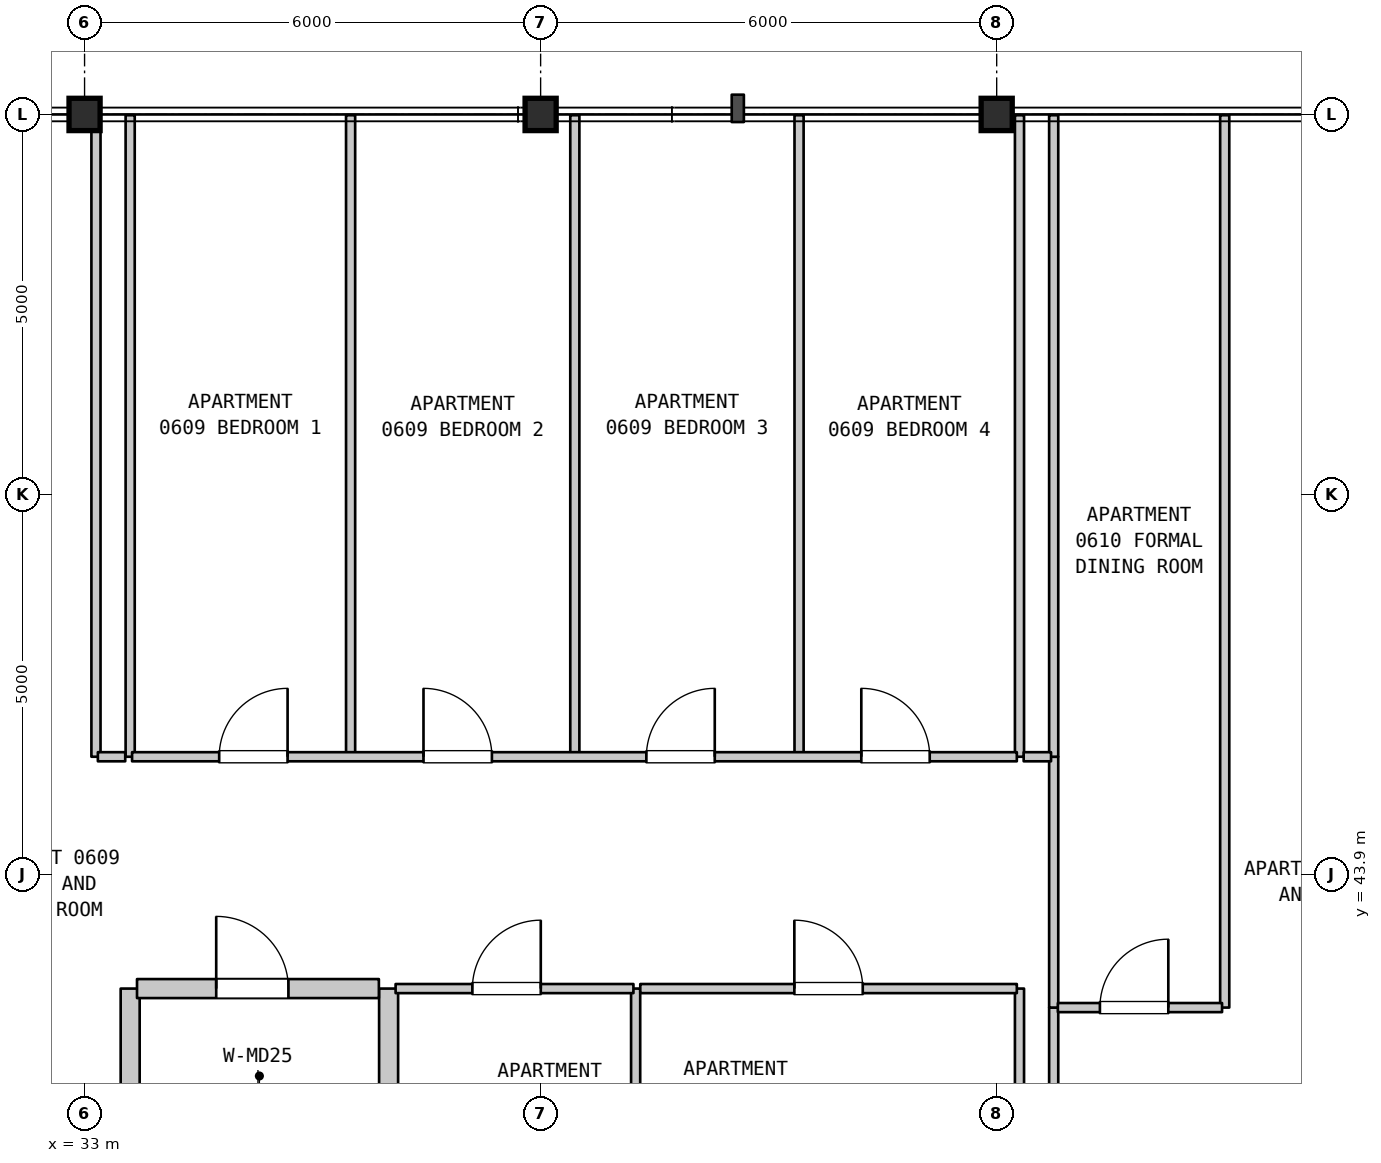
"""IFC4 building model, lengths in metres.
Left out: names, types, materials, properties, quantities, classifications, styles, units other than length and angle.
Written with IfcOpenShell. Run it as: python <this file> out.ifc"""

import sys

from ifc_helpers import new_model, si_unit, direction, frame, frame_2d, origin, origin_2d, place, context, subcontext, project, spatial, rectangle, i_section, extrude, element, fill, save


model = new_model("IFC4")
c1 = context("Model", 3, precision=1e-05, world=origin(), true_north=direction((0.0, 1.0)))
c2 = subcontext(c1, "Body", "Model", "MODEL_VIEW")
j1 = project(units=[si_unit("LENGTHUNIT", "METRE"), si_unit("PLANEANGLEUNIT", "RADIAN")], contexts=[c1])
p1 = place(None, origin())
s1 = spatial("IfcSite", under=j1, at=p1, CompositionType="ELEMENT")
p2 = place(p1, origin())
s2 = spatial("IfcBuilding", under=s1, at=p2, CompositionType="ELEMENT")
p3 = place(p2, frame((0.0, 0.0, 31.4)))
s3 = spatial("IfcBuildingStorey", under=s2, at=p3, CompositionType="ELEMENT", Elevation=31.4)
for number, where, z_axis, x_axis in (
    (1, (33.0, 53.9, 0.0), (0.0, 0.0, 1.0), (1.0, 0.0, 0.0)),
    (2, (39.0, 53.9, 0.0), (0.0, 0.0, 1.0), (1.0, 0.0, 0.0)),
    (3, (45.0, 53.9, 0.0), (0.0, 0.0, 1.0), (1.0, 0.0, 0.0)),
):
    element("IfcColumn", number, at=place(p3, frame(where, z_axis=z_axis, x_axis=x_axis)), inside=s3, PredefinedType="COLUMN", context=c2, shape_type="SweptSolid", body=[
        extrude(i_section(OverallWidth=0.409, OverallDepth=0.425, WebThickness=0.032, FlangeThickness=0.052, FilletRadius=0.015, at=origin_2d()), origin(), (0.0, 0.0, 1.0), 3.7),
    ])
p4 = place(p3, frame((33.15, 45.45, 0.0), z_axis=(0.0, 0.0, 1.0), x_axis=(0.0, 1.0, 0.0)))
e4 = element("IfcWall", 4, at=p4, inside=s3, PredefinedType="PARTITIONING", context=c2, shape_type="SweptSolid", body=[
    extrude(rectangle(XDim=8.44, YDim=0.12, at=frame_2d((4.22, 0.0))), origin(), (0.0, 0.0, 1.0), 2.785),
])
p5 = place(p3, frame((33.6, 40.1, 0.0), z_axis=(0.0, 0.0, 1.0), x_axis=(0.0, 1.0, 0.0)))
e5 = element("IfcWall", 5, at=p5, inside=s3, PredefinedType="STANDARD", context=c2, shape_type="SweptSolid", body=[
    extrude(rectangle(XDim=2.3, YDim=0.25, at=frame_2d((1.15, 0.0))), origin(), (0.0, 0.0, 1.0), 3.385),
])
for number, where, z_axis, x_axis in (
    (6, (33.6, 45.45, 0.0), (0.0, 0.0, 1.0), (0.0, 1.0, 0.0)),
    (7, (36.5, 45.45, 0.0), (0.0, 0.0, 1.0), (0.0, 1.0, 0.0)),
):
    element("IfcWall", number, at=place(p3, frame(where, z_axis=z_axis, x_axis=x_axis)), inside=s3, PredefinedType="PARTITIONING", context=c2, shape_type="SweptSolid", body=[
        extrude(rectangle(XDim=8.44, YDim=0.12, at=frame_2d((4.22, 0.0))), origin(), (0.0, 0.0, 1.0), 3.385),
    ])
p6 = place(p3, frame((37.0, 40.1, 0.0), z_axis=(0.0, 0.0, 1.0), x_axis=(0.0, 1.0, 0.0)))
e8 = element("IfcWall", 8, at=p6, inside=s3, PredefinedType="STANDARD", context=c2, shape_type="SweptSolid", body=[
    extrude(rectangle(XDim=2.3, YDim=0.25, at=frame_2d((1.15, 0.0))), origin(), (0.0, 0.0, 1.0), 3.385),
])
p7 = place(p3, frame((39.45, 45.45, 0.0), z_axis=(0.0, 0.0, 1.0), x_axis=(0.0, 1.0, 0.0)))
e9 = element("IfcWall", 9, at=p7, inside=s3, PredefinedType="PARTITIONING", context=c2, shape_type="SweptSolid", body=[
    extrude(rectangle(XDim=8.44, YDim=0.12, at=frame_2d((4.22, 0.0))), origin(), (0.0, 0.0, 1.0), 3.385),
])
p8 = place(p3, frame((40.25, 40.1, 0.0), z_axis=(0.0, 0.0, 1.0), x_axis=(0.0, 1.0, 0.0)))
e10 = element("IfcWall", 10, at=p8, inside=s3, PredefinedType="PARTITIONING", context=c2, shape_type="SweptSolid", body=[
    extrude(rectangle(XDim=2.3, YDim=0.12, at=frame_2d((1.15, 0.0))), origin(), (0.0, 0.0, 1.0), 3.385),
])
p9 = place(p3, frame((42.4, 45.45, 0.0), z_axis=(0.0, 0.0, 1.0), x_axis=(0.0, 1.0, 0.0)))
e11 = element("IfcWall", 11, at=p9, inside=s3, PredefinedType="PARTITIONING", context=c2, shape_type="SweptSolid", body=[
    extrude(rectangle(XDim=8.44, YDim=0.12, at=frame_2d((4.22, 0.0))), origin(), (0.0, 0.0, 1.0), 3.385),
])
p10 = place(p3, frame((45.3, 40.1, 0.0), z_axis=(0.0, 0.0, 1.0), x_axis=(0.0, 1.0, 0.0)))
e12 = element("IfcWall", 12, at=p10, inside=s3, PredefinedType="PARTITIONING", context=c2, shape_type="SweptSolid", body=[
    extrude(rectangle(XDim=2.3, YDim=0.12, at=frame_2d((1.15, 0.0))), origin(), (0.0, 0.0, 1.0), 3.385),
])
p11 = place(p3, frame((45.3, 45.45, 0.0), z_axis=(0.0, 0.0, 1.0), x_axis=(0.0, 1.0, 0.0)))
e13 = element("IfcWall", 13, at=p11, inside=s3, PredefinedType="PARTITIONING", context=c2, shape_type="SweptSolid", body=[
    extrude(rectangle(XDim=8.44, YDim=0.12, at=frame_2d((4.22, 0.0))), origin(), (0.0, 0.0, 1.0), 3.385),
])
p12 = place(p3, frame((45.75, 40.1, 0.0), z_axis=(0.0, 0.0, 1.0), x_axis=(0.0, 1.0, 0.0)))
e14 = element("IfcWall", 14, at=p12, inside=s3, PredefinedType="PARTITIONING", context=c2, shape_type="SweptSolid", body=[
    extrude(rectangle(XDim=2.05, YDim=0.12, at=frame_2d((1.025, 0.0))), origin(), (0.0, 0.0, 1.0), 3.385),
])
p13 = place(p3, frame((45.75, 42.15, 0.0), z_axis=(0.0, 0.0, 1.0), x_axis=(0.0, 1.0, 0.0)))
e15 = element("IfcWall", 15, at=p13, inside=s3, PredefinedType="PARTITIONING", context=c2, shape_type="SweptSolid", body=[
    extrude(rectangle(XDim=3.3, YDim=0.12, at=frame_2d((1.65, 0.0))), origin(), (0.0, 0.0, 1.0), 3.385),
])
p14 = place(p3, frame((45.75, 45.45, 0.0), z_axis=(0.0, 0.0, 1.0), x_axis=(0.0, 1.0, 0.0)))
e16 = element("IfcWall", 16, at=p14, inside=s3, PredefinedType="PARTITIONING", context=c2, shape_type="SweptSolid", body=[
    extrude(rectangle(XDim=8.44, YDim=0.12, at=frame_2d((4.22, 0.0))), origin(), (0.0, 0.0, 1.0), 3.385),
])
p15 = place(p3, frame((48.0, 42.15, 0.0), z_axis=(0.0, 0.0, 1.0), x_axis=(0.0, 1.0, 0.0)))
e17 = element("IfcWall", 17, at=p15, inside=s3, PredefinedType="PARTITIONING", context=c2, shape_type="SweptSolid", body=[
    extrude(rectangle(XDim=11.74, YDim=0.12, at=frame_2d((5.87, 0.0))), origin(), (0.0, 0.0, 1.0), 3.385),
])
p16 = place(p3, frame((45.805, 42.15, 0.0), z_axis=(0.0, 0.0, 1.0), x_axis=(1.0, 0.0, 0.0)))
e18 = element("IfcWall", 18, at=p16, inside=s3, PredefinedType="PARTITIONING", context=c2, shape_type="SweptSolid", body=[
    extrude(rectangle(XDim=2.16, YDim=0.12, at=frame_2d((1.08, 0.0))), origin(), (0.0, 0.0, 1.0), 3.385),
])
p17 = place(p16, frame((0.553, 0.0, 0.0)))
e19 = element("IfcOpeningElement", 19, at=p17, cuts=e18, PredefinedType="OPENING", context=c2, shape_type="SweptSolid", body=[
    extrude(rectangle(XDim=0.9, YDim=2.15, at=frame_2d((0.45, 1.075))), frame((0.0, 0.07, 0.0), z_axis=(0.0, -1.0, 0.0), x_axis=(1.0, 0.0, 0.0)), (0.0, 0.0, 1.0), 0.14),
])
p18 = place(p3, frame((33.69, 42.4, 0.0), z_axis=(0.0, 0.0, 1.0), x_axis=(1.0, 0.0, 0.0)))
e20 = element("IfcWall", 20, at=p18, inside=s3, PredefinedType="STANDARD", context=c2, shape_type="SweptSolid", body=[
    extrude(rectangle(XDim=3.182, YDim=0.25, at=frame_2d((1.591, 0.0))), origin(), (0.0, 0.0, 1.0), 3.385),
])
p19 = place(p18, frame((1.042, 0.0, 0.0)))
e21 = element("IfcOpeningElement", 21, at=p19, cuts=e20, PredefinedType="OPENING", context=c2, shape_type="SweptSolid", body=[
    extrude(rectangle(XDim=0.95, YDim=2.15, at=frame_2d((0.475, 1.075))), frame((0.0, 0.135, 0.0), z_axis=(0.0, -1.0, 0.0), x_axis=(1.0, 0.0, 0.0)), (0.0, 0.0, 1.0), 0.27),
])
p20 = place(p3, frame((37.092, 42.4, 0.0), z_axis=(0.0, 0.0, 1.0), x_axis=(1.0, 0.0, 0.0)))
e22 = element("IfcWall", 22, at=p20, inside=s3, PredefinedType="PARTITIONING", context=c2, shape_type="SweptSolid", body=[
    extrude(rectangle(XDim=3.129, YDim=0.12, at=frame_2d((1.564, 0.0))), origin(), (0.0, 0.0, 1.0), 3.385),
])
p21 = place(p20, frame((1.01, 0.0, 0.0)))
e23 = element("IfcOpeningElement", 23, at=p21, cuts=e22, PredefinedType="OPENING", context=c2, shape_type="SweptSolid", body=[
    extrude(rectangle(XDim=0.9, YDim=2.1, at=frame_2d((0.45, 1.05))), frame((0.0, 0.07, 0.0), z_axis=(0.0, -1.0, 0.0), x_axis=(1.0, 0.0, 0.0)), (0.0, 0.0, 1.0), 0.14),
])
p22 = place(p3, frame((40.311, 42.4, 0.0), z_axis=(0.0, 0.0, 1.0), x_axis=(1.0, 0.0, 0.0)))
e24 = element("IfcWall", 24, at=p22, inside=s3, PredefinedType="PARTITIONING", context=c2, shape_type="SweptSolid", body=[
    extrude(rectangle(XDim=4.954, YDim=0.12, at=frame_2d((2.477, 0.0))), origin(), (0.0, 0.0, 1.0), 3.385),
])
p23 = place(p22, frame((2.027, 0.0, 0.0)))
e25 = element("IfcOpeningElement", 25, at=p23, cuts=e24, PredefinedType="OPENING", context=c2, shape_type="SweptSolid", body=[
    extrude(rectangle(XDim=0.9, YDim=2.15, at=frame_2d((0.45, 1.075))), frame((0.0, 0.07, 0.0), z_axis=(0.0, -1.0, 0.0), x_axis=(1.0, 0.0, 0.0)), (0.0, 0.0, 1.0), 0.14),
])
p24 = place(p3, frame((33.175, 45.45, 0.0), z_axis=(0.0, 0.0, 1.0), x_axis=(1.0, 0.0, 0.0)))
e26 = element("IfcWall", 26, at=p24, inside=s3, PredefinedType="PARTITIONING", context=c2, shape_type="SweptSolid", body=[
    extrude(rectangle(XDim=0.36, YDim=0.12, at=frame_2d((0.18, 0.0))), origin(), (0.0, 0.0, 1.0), 3.385),
])
p25 = place(p3, frame((33.625, 45.45, 0.0), z_axis=(0.0, 0.0, 1.0), x_axis=(1.0, 0.0, 0.0)))
e27 = element("IfcWall", 27, at=p25, inside=s3, PredefinedType="PARTITIONING", context=c2, shape_type="SweptSolid", body=[
    extrude(rectangle(XDim=11.64, YDim=0.12, at=frame_2d((5.82, 0.0))), origin(), (0.0, 0.0, 1.0), 3.385),
])
p26 = place(p25, frame((1.146, 0.0, 0.0)))
e28 = element("IfcOpeningElement", 28, at=p26, cuts=e27, PredefinedType="OPENING", context=c2, shape_type="SweptSolid", body=[
    extrude(rectangle(XDim=0.9, YDim=2.15, at=frame_2d((0.45, 1.075))), frame((0.0, 0.07, 0.0), z_axis=(0.0, -1.0, 0.0), x_axis=(1.0, 0.0, 0.0)), (0.0, 0.0, 1.0), 0.14),
])
p27 = place(p25, frame((3.834, 0.0, 0.0)))
e29 = element("IfcOpeningElement", 29, at=p27, cuts=e27, PredefinedType="OPENING", context=c2, shape_type="SweptSolid", body=[
    extrude(rectangle(XDim=0.9, YDim=2.15, at=frame_2d((0.45, 1.075))), frame((0.0, 0.07, 0.0), z_axis=(0.0, -1.0, 0.0), x_axis=(1.0, 0.0, 0.0)), (0.0, 0.0, 1.0), 0.14),
])
p28 = place(p25, frame((6.766, 0.0, 0.0)))
e30 = element("IfcOpeningElement", 30, at=p28, cuts=e27, PredefinedType="OPENING", context=c2, shape_type="SweptSolid", body=[
    extrude(rectangle(XDim=0.9, YDim=2.15, at=frame_2d((0.45, 1.075))), frame((0.0, 0.07, 0.0), z_axis=(0.0, -1.0, 0.0), x_axis=(1.0, 0.0, 0.0)), (0.0, 0.0, 1.0), 0.14),
])
p29 = place(p25, frame((9.594, 0.0, 0.0)))
e31 = element("IfcOpeningElement", 31, at=p29, cuts=e27, PredefinedType="OPENING", context=c2, shape_type="SweptSolid", body=[
    extrude(rectangle(XDim=0.9, YDim=2.15, at=frame_2d((0.45, 1.075))), frame((0.0, 0.07, 0.0), z_axis=(0.0, -1.0, 0.0), x_axis=(1.0, 0.0, 0.0)), (0.0, 0.0, 1.0), 0.14),
])
p30 = place(p3, frame((45.355, 45.45, 0.0), z_axis=(0.0, 0.0, 1.0), x_axis=(1.0, 0.0, 0.0)))
e32 = element("IfcWall", 32, at=p30, inside=s3, PredefinedType="PARTITIONING", context=c2, shape_type="SweptSolid", body=[
    extrude(rectangle(XDim=0.36, YDim=0.12, at=frame_2d((0.18, 0.0))), origin(), (0.0, 0.0, 1.0), 3.385),
])
p31 = place(p17, origin())
e33 = element("IfcDoor", 33, at=p31, inside=s3, OperationType="SINGLE_SWING_RIGHT", PredefinedType="DOOR", context=c2, shape_type="SweptSolid", body=[
    extrude(rectangle(XDim=0.9, YDim=2.15, at=frame_2d((0.45, 1.075))), frame((0.0, 0.025, 0.0), z_axis=(0.0, -1.0, 0.0), x_axis=(1.0, 0.0, 0.0)), (0.0, 0.0, 1.0), 0.05),
])
fill(e19, e33)
p32 = place(p19, origin())
e34 = element("IfcDoor", 34, at=p32, inside=s3, OperationType="SINGLE_SWING_LEFT", PredefinedType="DOOR", context=c2, shape_type="SweptSolid", body=[
    extrude(rectangle(XDim=0.95, YDim=2.15, at=frame_2d((0.475, 1.075))), frame((0.0, 0.025, 0.0), z_axis=(0.0, -1.0, 0.0), x_axis=(1.0, 0.0, 0.0)), (0.0, 0.0, 1.0), 0.05),
])
fill(e21, e34)
p33 = place(p21, origin())
e35 = element("IfcDoor", 35, at=p33, inside=s3, OperationType="SINGLE_SWING_RIGHT", PredefinedType="DOOR", context=c2, shape_type="SweptSolid", body=[
    extrude(rectangle(XDim=0.9, YDim=2.1, at=frame_2d((0.45, 1.05))), frame((0.0, 0.025, 0.0), z_axis=(0.0, -1.0, 0.0), x_axis=(1.0, 0.0, 0.0)), (0.0, 0.0, 1.0), 0.05),
])
fill(e23, e35)
p34 = place(p23, origin())
e36 = element("IfcDoor", 36, at=p34, inside=s3, OperationType="SINGLE_SWING_LEFT", PredefinedType="DOOR", context=c2, shape_type="SweptSolid", body=[
    extrude(rectangle(XDim=0.9, YDim=2.15, at=frame_2d((0.45, 1.075))), frame((0.0, 0.025, 0.0), z_axis=(0.0, -1.0, 0.0), x_axis=(1.0, 0.0, 0.0)), (0.0, 0.0, 1.0), 0.05),
])
fill(e25, e36)
p35 = place(p26, origin())
e37 = element("IfcDoor", 37, at=p35, inside=s3, OperationType="SINGLE_SWING_RIGHT", PredefinedType="DOOR", context=c2, shape_type="SweptSolid", body=[
    extrude(rectangle(XDim=0.9, YDim=2.15, at=frame_2d((0.45, 1.075))), frame((0.0, 0.025, 0.0), z_axis=(0.0, -1.0, 0.0), x_axis=(1.0, 0.0, 0.0)), (0.0, 0.0, 1.0), 0.05),
])
fill(e28, e37)
p36 = place(p27, origin())
e38 = element("IfcDoor", 38, at=p36, inside=s3, OperationType="SINGLE_SWING_LEFT", PredefinedType="DOOR", context=c2, shape_type="SweptSolid", body=[
    extrude(rectangle(XDim=0.9, YDim=2.15, at=frame_2d((0.45, 1.075))), frame((0.0, 0.025, 0.0), z_axis=(0.0, -1.0, 0.0), x_axis=(1.0, 0.0, 0.0)), (0.0, 0.0, 1.0), 0.05),
])
fill(e29, e38)
p37 = place(p28, origin())
e39 = element("IfcDoor", 39, at=p37, inside=s3, OperationType="SINGLE_SWING_RIGHT", PredefinedType="DOOR", context=c2, shape_type="SweptSolid", body=[
    extrude(rectangle(XDim=0.9, YDim=2.15, at=frame_2d((0.45, 1.075))), frame((0.0, 0.025, 0.0), z_axis=(0.0, -1.0, 0.0), x_axis=(1.0, 0.0, 0.0)), (0.0, 0.0, 1.0), 0.05),
])
fill(e30, e39)
p38 = place(p29, origin())
e40 = element("IfcDoor", 40, at=p38, inside=s3, OperationType="SINGLE_SWING_LEFT", PredefinedType="DOOR", context=c2, shape_type="SweptSolid", body=[
    extrude(rectangle(XDim=0.9, YDim=2.15, at=frame_2d((0.45, 1.075))), frame((0.0, 0.025, 0.0), z_axis=(0.0, -1.0, 0.0), x_axis=(1.0, 0.0, 0.0)), (0.0, 0.0, 1.0), 0.05),
])
fill(e31, e40)
save(model, sys.argv[1])
